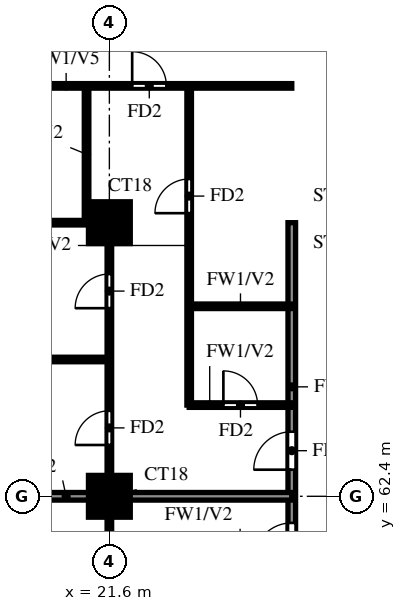
"""IFC4 building model, lengths in metres.
Left out: names, types, materials, properties, quantities, classifications, styles, units other than length and angle.
Written with IfcOpenShell. Run it as: python <this file> out.ifc"""

import sys

from ifc_helpers import new_model, si_unit, direction, frame, frame_2d, origin, origin_2d, place, context, subcontext, project, spatial, rectangle, extrude, source, transform, mapped, element, fill, save


model = new_model("IFC4")
c1 = context("Model", 3, precision=1e-05, world=origin(), true_north=direction((0.0, 1.0)))
c2 = subcontext(c1, "Body", "Model", "MODEL_VIEW")
j1 = project(units=[si_unit("LENGTHUNIT", "METRE"), si_unit("PLANEANGLEUNIT", "RADIAN")], contexts=[c1])
p1 = place(None, origin())
s1 = spatial("IfcSite", under=j1, at=p1, CompositionType="ELEMENT")
p2 = place(p1, origin())
s2 = spatial("IfcBuilding", under=s1, at=p2, CompositionType="ELEMENT")
p3 = place(p2, frame((0.0, 0.0, 120.0)))
s3 = spatial("IfcBuildingStorey", under=s2, at=p3, CompositionType="ELEMENT", Elevation=120.0)
m1 = source(origin(), c2, "Body", "SweptSolid", [
    extrude(rectangle(XDim=1.1, YDim=1.1, at=origin_2d()), origin(), (0.0, 0.0, 1.0), 3.2),
])
for number, where, z_axis, x_axis in (
    (1, (21.6, 62.4, 0.0), (0.0, 0.0, 1.0), (1.0, 0.0, 0.0)),
    (2, (21.6, 69.6, 0.0), (0.0, 0.0, 1.0), (1.0, 0.0, 0.0)),
):
    element("IfcColumn", number, at=place(p3, frame(where, z_axis=z_axis, x_axis=x_axis)), inside=s3, PredefinedType="COLUMN", context=c2, shape_type="MappedRepresentation", body=[
        mapped(m1, transform((0.0, 0.0, 0.0))),
    ])
p4 = place(p3, frame((26.4, 60.0, 0.0), z_axis=(0.0, 0.0, 1.0), x_axis=(0.0, 1.0, 0.0)))
e3 = element("IfcWall", 3, at=p4, inside=s3, PredefinedType="SOLIDWALL", context=c2, shape_type="SweptSolid", body=[
    extrude(rectangle(XDim=9.6, YDim=0.2, at=frame_2d((4.8, 0.0))), origin(), (0.0, 0.0, 1.0), 3.2),
])
p5 = place(p4, frame((0.7, 0.0, 0.0)))
e4 = element("IfcOpeningElement", 4, at=p5, cuts=e3, PredefinedType="OPENING", context=c2, shape_type="SweptSolid", body=[
    extrude(rectangle(XDim=1.0, YDim=2.1, at=frame_2d((0.5, 1.05))), frame((0.0, 0.11, 0.0), z_axis=(0.0, -1.0, 0.0), x_axis=(1.0, 0.0, 0.0)), (0.0, 0.0, 1.0), 0.22),
])
p6 = place(p4, frame((3.1, 0.0, 0.0)))
e5 = element("IfcOpeningElement", 5, at=p6, cuts=e3, PredefinedType="OPENING", context=c2, shape_type="SweptSolid", body=[
    extrude(rectangle(XDim=1.0, YDim=2.1, at=frame_2d((0.5, 1.05))), frame((0.0, 0.11, 0.0), z_axis=(0.0, -1.0, 0.0), x_axis=(1.0, 0.0, 0.0)), (0.0, 0.0, 1.0), 0.22),
])
p7 = place(p3, frame((14.525, 62.4, 0.0), z_axis=(0.0, 0.0, 1.0), x_axis=(1.0, 0.0, 0.0)))
e6 = element("IfcWall", 6, at=p7, inside=s3, PredefinedType="SOLIDWALL", context=c2, shape_type="SweptSolid", body=[
    extrude(rectangle(XDim=11.875, YDim=0.2, at=frame_2d((5.938, 0.0))), origin(), (0.0, 0.0, 1.0), 3.2),
])
p8 = place(p3, frame((23.7, 64.8, 0.0), z_axis=(0.0, 0.0, 1.0), x_axis=(1.0, 0.0, 0.0)))
e7 = element("IfcWall", 7, at=p8, inside=s3, PredefinedType="PARTITIONING", context=c2, shape_type="SweptSolid", body=[
    extrude(rectangle(XDim=2.7, YDim=0.12, at=frame_2d((1.35, 0.0))), origin(), (0.0, 0.0, 1.0), 3.2),
])
p9 = place(p8, frame((0.9, 0.0, 0.0)))
e8 = element("IfcOpeningElement", 8, at=p9, cuts=e7, PredefinedType="OPENING", context=c2, shape_type="SweptSolid", body=[
    extrude(rectangle(XDim=0.9, YDim=2.1, at=frame_2d((0.45, 1.05))), frame((0.0, 0.07, 0.0), z_axis=(0.0, -1.0, 0.0), x_axis=(1.0, 0.0, 0.0)), (0.0, 0.0, 1.0), 0.14),
])
p10 = place(p3, frame((14.525, 66.0, 0.0), z_axis=(0.0, 0.0, 1.0), x_axis=(1.0, 0.0, 0.0)))
e9 = element("IfcWall", 9, at=p10, inside=s3, PredefinedType="PARTITIONING", context=c2, shape_type="SweptSolid", body=[
    extrude(rectangle(XDim=7.075, YDim=0.12, at=frame_2d((3.538, 0.0))), origin(), (0.0, 0.0, 1.0), 2.3),
])
p11 = place(p3, frame((23.7, 67.4, 0.0), z_axis=(0.0, 0.0, 1.0), x_axis=(1.0, 0.0, 0.0)))
e10 = element("IfcWall", 10, at=p11, inside=s3, PredefinedType="PARTITIONING", context=c2, shape_type="SweptSolid", body=[
    extrude(rectangle(XDim=2.7, YDim=0.12, at=frame_2d((1.35, 0.0))), origin(), (0.0, 0.0, 1.0), 3.2),
])
p12 = place(p3, frame((14.525, 69.6, 0.0), z_axis=(0.0, 0.0, 1.0), x_axis=(1.0, 0.0, 0.0)))
e11 = element("IfcWall", 11, at=p12, inside=s3, PredefinedType="PARTITIONING", context=c2, shape_type="SweptSolid", body=[
    extrude(rectangle(XDim=7.075, YDim=0.12, at=frame_2d((3.538, 0.0))), origin(), (0.0, 0.0, 1.0), 3.2),
])
p13 = place(p12, frame((2.837, 0.0, 0.0)))
e12 = element("IfcOpeningElement", 12, at=p13, cuts=e11, PredefinedType="OPENING", context=c2, shape_type="SweptSolid", body=[
    extrude(rectangle(XDim=0.8, YDim=2.1, at=frame_2d((0.4, 1.05))), frame((0.0, 0.07, 0.0), z_axis=(0.0, -1.0, 0.0), x_axis=(1.0, 0.0, 0.0)), (0.0, 0.0, 1.0), 0.14),
])
p14 = place(p3, frame((14.525, 73.2, 0.0), z_axis=(0.0, 0.0, 1.0), x_axis=(1.0, 0.0, 0.0)))
e13 = element("IfcWall", 13, at=p14, inside=s3, PredefinedType="PARTITIONING", context=c2, shape_type="SweptSolid", body=[
    extrude(rectangle(XDim=11.875, YDim=0.12, at=frame_2d((5.938, 0.0))), origin(), (0.0, 0.0, 1.0), 2.3),
])
p15 = place(p14, frame((7.675, 0.0, 0.0)))
e14 = element("IfcOpeningElement", 14, at=p15, cuts=e13, PredefinedType="OPENING", context=c2, shape_type="SweptSolid", body=[
    extrude(rectangle(XDim=0.9, YDim=2.1, at=frame_2d((0.45, 1.05))), frame((0.0, 0.07, 0.0), z_axis=(0.0, -1.0, 0.0), x_axis=(1.0, 0.0, 0.0)), (0.0, 0.0, 1.0), 0.14),
])
p16 = place(p3, frame((21.0, 69.6, 0.0), z_axis=(0.0, 0.0, 1.0), x_axis=(0.0, 1.0, 0.0)))
e15 = element("IfcWall", 15, at=p16, inside=s3, PredefinedType="PARTITIONING", context=c2, shape_type="SweptSolid", body=[
    extrude(rectangle(XDim=3.6, YDim=0.12, at=frame_2d((1.8, 0.0))), origin(), (0.0, 0.0, 1.0), 3.2),
])
p17 = place(p3, frame((21.6, 48.0, 0.0), z_axis=(0.0, 0.0, 1.0), x_axis=(0.0, 1.0, 0.0)))
e16 = element("IfcWall", 16, at=p17, inside=s3, PredefinedType="PARTITIONING", context=c2, shape_type="SweptSolid", body=[
    extrude(rectangle(XDim=21.6, YDim=0.12, at=frame_2d((10.8, 0.0))), origin(), (0.0, 0.0, 1.0), 3.2),
])
p18 = place(p17, frame((1.35, 0.0, 0.0)))
e17 = element("IfcOpeningElement", 17, at=p18, cuts=e16, PredefinedType="OPENING", context=c2, shape_type="SweptSolid", body=[
    extrude(rectangle(XDim=0.9, YDim=2.1, at=frame_2d((0.45, 1.05))), frame((0.0, 0.07, 0.0), z_axis=(0.0, -1.0, 0.0), x_axis=(1.0, 0.0, 0.0)), (0.0, 0.0, 1.0), 0.14),
])
p19 = place(p17, frame((7.95, 0.0, 0.0)))
e18 = element("IfcOpeningElement", 18, at=p19, cuts=e16, PredefinedType="OPENING", context=c2, shape_type="SweptSolid", body=[
    extrude(rectangle(XDim=1.5, YDim=2.1, at=frame_2d((0.75, 1.05))), frame((0.0, 0.07, 0.0), z_axis=(0.0, -1.0, 0.0), x_axis=(1.0, 0.0, 0.0)), (0.0, 0.0, 1.0), 0.14),
])
p20 = place(p17, frame((12.15, 0.0, 0.0)))
e19 = element("IfcOpeningElement", 19, at=p20, cuts=e16, PredefinedType="OPENING", context=c2, shape_type="SweptSolid", body=[
    extrude(rectangle(XDim=0.9, YDim=2.1, at=frame_2d((0.45, 1.05))), frame((0.0, 0.07, 0.0), z_axis=(0.0, -1.0, 0.0), x_axis=(1.0, 0.0, 0.0)), (0.0, 0.0, 1.0), 0.14),
])
p21 = place(p17, frame((15.75, 0.0, 0.0)))
e20 = element("IfcOpeningElement", 20, at=p21, cuts=e16, PredefinedType="OPENING", context=c2, shape_type="SweptSolid", body=[
    extrude(rectangle(XDim=0.9, YDim=2.1, at=frame_2d((0.45, 1.05))), frame((0.0, 0.07, 0.0), z_axis=(0.0, -1.0, 0.0), x_axis=(1.0, 0.0, 0.0)), (0.0, 0.0, 1.0), 0.14),
])
p22 = place(p17, frame((19.35, 0.0, 0.0)))
e21 = element("IfcOpeningElement", 21, at=p22, cuts=e16, PredefinedType="OPENING", context=c2, shape_type="SweptSolid", body=[
    extrude(rectangle(XDim=0.9, YDim=2.1, at=frame_2d((0.45, 1.05))), frame((0.0, 0.07, 0.0), z_axis=(0.0, -1.0, 0.0), x_axis=(1.0, 0.0, 0.0)), (0.0, 0.0, 1.0), 0.14),
])
p23 = place(p3, frame((23.7, 64.8, 0.0), z_axis=(0.0, 0.0, 1.0), x_axis=(0.0, 1.0, 0.0)))
e22 = element("IfcWall", 22, at=p23, inside=s3, PredefinedType="PARTITIONING", context=c2, shape_type="SweptSolid", body=[
    extrude(rectangle(XDim=8.4, YDim=0.12, at=frame_2d((4.2, 0.0))), origin(), (0.0, 0.0, 1.0), 3.2),
])
p24 = place(p23, frame((5.05, 0.0, 0.0)))
e23 = element("IfcOpeningElement", 23, at=p24, cuts=e22, PredefinedType="OPENING", context=c2, shape_type="SweptSolid", body=[
    extrude(rectangle(XDim=0.9, YDim=2.1, at=frame_2d((0.45, 1.05))), frame((0.0, 0.07, 0.0), z_axis=(0.0, -1.0, 0.0), x_axis=(1.0, 0.0, 0.0)), (0.0, 0.0, 1.0), 0.14),
])
p25 = place(p5, origin())
e24 = element("IfcDoor", 24, at=p25, inside=s3, OperationType="SINGLE_SWING_LEFT", PredefinedType="DOOR", context=c2, shape_type="SweptSolid", body=[
    extrude(rectangle(XDim=1.0, YDim=2.1, at=frame_2d((0.5, 1.05))), frame((0.0, 0.025, 0.0), z_axis=(0.0, -1.0, 0.0), x_axis=(1.0, 0.0, 0.0)), (0.0, 0.0, 1.0), 0.05),
])
fill(e4, e24)
p26 = place(p6, origin())
e25 = element("IfcDoor", 25, at=p26, inside=s3, OperationType="SINGLE_SWING_LEFT", PredefinedType="DOOR", context=c2, shape_type="SweptSolid", body=[
    extrude(rectangle(XDim=1.0, YDim=2.1, at=frame_2d((0.5, 1.05))), frame((0.0, 0.025, 0.0), z_axis=(0.0, -1.0, 0.0), x_axis=(1.0, 0.0, 0.0)), (0.0, 0.0, 1.0), 0.05),
])
fill(e5, e25)
p27 = place(p21, origin())
e26 = element("IfcDoor", 26, at=p27, inside=s3, OperationType="SINGLE_SWING_LEFT", PredefinedType="DOOR", context=c2, shape_type="SweptSolid", body=[
    extrude(rectangle(XDim=0.9, YDim=2.1, at=frame_2d((0.45, 1.05))), frame((0.0, 0.025, 0.0), z_axis=(0.0, -1.0, 0.0), x_axis=(1.0, 0.0, 0.0)), (0.0, 0.0, 1.0), 0.05),
])
fill(e20, e26)
p28 = place(p22, origin())
e27 = element("IfcDoor", 27, at=p28, inside=s3, OperationType="SINGLE_SWING_RIGHT", PredefinedType="DOOR", context=c2, shape_type="SweptSolid", body=[
    extrude(rectangle(XDim=0.9, YDim=2.1, at=frame_2d((0.45, 1.05))), frame((0.0, 0.025, 0.0), z_axis=(0.0, -1.0, 0.0), x_axis=(1.0, 0.0, 0.0)), (0.0, 0.0, 1.0), 0.05),
])
fill(e21, e27)
p29 = place(p15, origin())
e28 = element("IfcDoor", 28, at=p29, inside=s3, OperationType="SINGLE_SWING_LEFT", PredefinedType="DOOR", context=c2, shape_type="SweptSolid", body=[
    extrude(rectangle(XDim=0.9, YDim=2.1, at=frame_2d((0.45, 1.05))), frame((0.0, 0.025, 0.0), z_axis=(0.0, -1.0, 0.0), x_axis=(1.0, 0.0, 0.0)), (0.0, 0.0, 1.0), 0.05),
])
fill(e14, e28)
p30 = place(p9, origin())
e29 = element("IfcDoor", 29, at=p30, inside=s3, OperationType="SINGLE_SWING_RIGHT", PredefinedType="DOOR", context=c2, shape_type="SweptSolid", body=[
    extrude(rectangle(XDim=0.9, YDim=2.1, at=frame_2d((0.45, 1.05))), frame((0.0, 0.025, 0.0), z_axis=(0.0, -1.0, 0.0), x_axis=(1.0, 0.0, 0.0)), (0.0, 0.0, 1.0), 0.05),
])
fill(e8, e29)
p31 = place(p24, origin())
e30 = element("IfcDoor", 30, at=p31, inside=s3, OperationType="SINGLE_SWING_LEFT", PredefinedType="DOOR", context=c2, shape_type="SweptSolid", body=[
    extrude(rectangle(XDim=0.9, YDim=2.1, at=frame_2d((0.45, 1.05))), frame((0.0, 0.025, 0.0), z_axis=(0.0, -1.0, 0.0), x_axis=(1.0, 0.0, 0.0)), (0.0, 0.0, 1.0), 0.05),
])
fill(e23, e30)
save(model, sys.argv[1])
